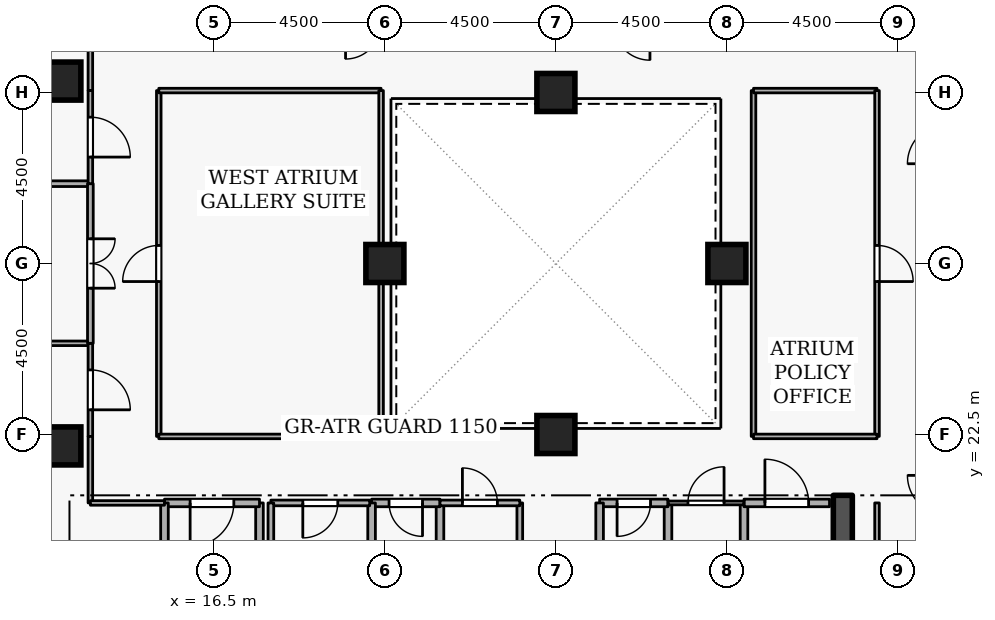
"""IFC4 building model, lengths in metres.
Left out: names, types, materials, properties, quantities, classifications, styles, units other than length and angle.
Written with IfcOpenShell. Run it as: python <this file> out.ifc"""

import sys

from ifc_helpers import new_model, si_unit, direction, frame, frame_2d, origin, origin_2d, place, context, subcontext, project, spatial, rectangle, extrude, element, fill, save


model = new_model("IFC4")
c1 = context("Model", 3, precision=1e-05, world=origin(), true_north=direction((0.0, 1.0)))
c2 = subcontext(c1, "Body", "Model", "MODEL_VIEW")
j1 = project(units=[si_unit("LENGTHUNIT", "METRE"), si_unit("PLANEANGLEUNIT", "RADIAN")], contexts=[c1])
p1 = place(None, origin())
s1 = spatial("IfcSite", under=j1, at=p1, CompositionType="ELEMENT")
p2 = place(p1, origin())
s2 = spatial("IfcBuilding", under=s1, at=p2, CompositionType="ELEMENT")
p3 = place(p2, frame((0.0, 0.0, 207.3)))
s3 = spatial("IfcBuildingStorey", under=s2, at=p3, CompositionType="ELEMENT", Elevation=207.3)
p4 = place(p3, frame((33.05, 15.1, 0.0), z_axis=(0.0, 0.0, 1.0), x_axis=(0.0, 1.0, 0.0)))
e1 = element("IfcWall", 1, at=p4, inside=s3, PredefinedType="SHEAR", context=c2, shape_type="SweptSolid", body=[
    extrude(rectangle(XDim=5.8, YDim=0.5, at=frame_2d((2.9, 0.0))), origin(), (0.0, 0.0, 1.0), 3.6),
])
for number, where, z_axis, x_axis in (
    (2, (12.5, 22.2, 0.0), (0.0, 0.0, 1.0), (1.0, 0.0, 0.0)),
    (3, (12.5, 31.8, 0.0), (0.0, 0.0, 1.0), (1.0, 0.0, 0.0)),
    (4, (25.5, 22.5, 0.0), (0.0, 0.0, 1.0), (1.0, 0.0, 0.0)),
    (5, (25.5, 31.5, 0.0), (0.0, 0.0, 1.0), (1.0, 0.0, 0.0)),
    (6, (21.0, 27.0, 0.0), (0.0, 0.0, 1.0), (1.0, 0.0, 0.0)),
    (7, (30.0, 27.0, 0.0), (0.0, 0.0, 1.0), (1.0, 0.0, 0.0)),
):
    element("IfcColumn", number, at=place(p3, frame(where, z_axis=z_axis, x_axis=x_axis)), inside=s3, PredefinedType="COLUMN", context=c2, shape_type="SweptSolid", body=[
        extrude(rectangle(XDim=1.0, YDim=1.0, at=origin_2d()), origin(), (0.0, 0.0, 1.0), 3.6),
    ])
p5 = place(p3, frame((17.7, 18.4, 0.0), z_axis=(0.0, 0.0, 1.0), x_axis=(0.0, 1.0, 0.0)))
e8 = element("IfcWall", 8, at=p5, inside=s3, PredefinedType="STANDARD", context=c2, shape_type="SweptSolid", body=[
    extrude(rectangle(XDim=2.3, YDim=0.2, at=frame_2d((1.15, 0.0))), origin(), (0.0, 0.0, 1.0), 2.545),
])
p6 = place(p3, frame((17.7, 20.7, 0.0), z_axis=(0.0, 0.0, 1.0), x_axis=(-1.0, 0.0, 0.0)))
e9 = element("IfcWall", 9, at=p6, inside=s3, PredefinedType="STANDARD", context=c2, shape_type="SweptSolid", body=[
    extrude(rectangle(XDim=2.5, YDim=0.2, at=frame_2d((1.25, 0.0))), origin(), (0.0, 0.0, 1.0), 3.34),
])
p7 = place(p6, frame((0.675, 0.0, 0.0)))
e10 = element("IfcOpeningElement", 10, at=p7, cuts=e9, PredefinedType="OPENING", context=c2, shape_type="SweptSolid", body=[
    extrude(rectangle(XDim=1.15, YDim=2.1, at=frame_2d((0.575, 1.05))), frame((0.0, 0.11, 0.0), z_axis=(0.0, -1.0, 0.0), x_axis=(1.0, 0.0, 0.0)), (0.0, 0.0, 1.0), 0.22),
])
p8 = place(p3, frame((15.2, 20.7, 0.0), z_axis=(0.0, 0.0, 1.0), x_axis=(0.0, -1.0, 0.0)))
e11 = element("IfcWall", 11, at=p8, inside=s3, PredefinedType="STANDARD", context=c2, shape_type="SweptSolid", body=[
    extrude(rectangle(XDim=5.7, YDim=0.2, at=frame_2d((2.85, 0.0))), origin(), (0.0, 0.0, 1.0), 3.34),
])
p9 = place(p3, frame((28.45, 18.65, 0.0), z_axis=(0.0, 0.0, 1.0), x_axis=(0.0, 1.0, 0.0)))
e12 = element("IfcWall", 12, at=p9, inside=s3, PredefinedType="STANDARD", context=c2, shape_type="SweptSolid", body=[
    extrude(rectangle(XDim=2.05, YDim=0.2, at=frame_2d((1.025, 0.0))), origin(), (0.0, 0.0, 1.0), 3.34),
])
p10 = place(p3, frame((28.45, 20.7, 0.0), z_axis=(0.0, 0.0, 1.0), x_axis=(-1.0, 0.0, 0.0)))
e13 = element("IfcWall", 13, at=p10, inside=s3, PredefinedType="STANDARD", context=c2, shape_type="SweptSolid", body=[
    extrude(rectangle(XDim=1.8, YDim=0.2, at=frame_2d((0.9, 0.0))), origin(), (0.0, 0.0, 1.0), 3.34),
])
p11 = place(p10, frame((0.46, 0.0, 0.0)))
e14 = element("IfcOpeningElement", 14, at=p11, cuts=e13, PredefinedType="OPENING", context=c2, shape_type="SweptSolid", body=[
    extrude(rectangle(XDim=0.88, YDim=2.04, at=frame_2d((0.44, 1.02))), frame((0.0, 0.11, 0.0), z_axis=(0.0, -1.0, 0.0), x_axis=(1.0, 0.0, 0.0)), (0.0, 0.0, 1.0), 0.22),
])
for number, where, z_axis, x_axis in (
    (15, (26.65, 20.7, 0.0), (0.0, 0.0, 1.0), (0.0, -1.0, 0.0)),
    (16, (22.45, 18.65, 0.0), (0.0, 0.0, 1.0), (0.0, 1.0, 0.0)),
):
    element("IfcWall", number, at=place(p3, frame(where, z_axis=z_axis, x_axis=x_axis)), inside=s3, PredefinedType="STANDARD", context=c2, shape_type="SweptSolid", body=[
        extrude(rectangle(XDim=2.05, YDim=0.2, at=frame_2d((1.025, 0.0))), origin(), (0.0, 0.0, 1.0), 3.34),
    ])
p12 = place(p3, frame((22.45, 20.7, 0.0), z_axis=(0.0, 0.0, 1.0), x_axis=(-1.0, 0.0, 0.0)))
e17 = element("IfcWall", 17, at=p12, inside=s3, PredefinedType="STANDARD", context=c2, shape_type="SweptSolid", body=[
    extrude(rectangle(XDim=1.8, YDim=0.2, at=frame_2d((0.9, 0.0))), origin(), (0.0, 0.0, 1.0), 3.34),
])
p13 = place(p12, frame((0.46, 0.0, 0.0)))
e18 = element("IfcOpeningElement", 18, at=p13, cuts=e17, PredefinedType="OPENING", context=c2, shape_type="SweptSolid", body=[
    extrude(rectangle(XDim=0.88, YDim=2.04, at=frame_2d((0.44, 1.02))), frame((0.0, 0.11, 0.0), z_axis=(0.0, -1.0, 0.0), x_axis=(1.0, 0.0, 0.0)), (0.0, 0.0, 1.0), 0.22),
])
for number, where, z_axis, x_axis in (
    (19, (20.65, 20.7, 0.0), (0.0, 0.0, 1.0), (0.0, -1.0, 0.0)),
    (20, (30.45, 18.65, 0.0), (0.0, 0.0, 1.0), (0.0, 1.0, 0.0)),
):
    element("IfcWall", number, at=place(p3, frame(where, z_axis=z_axis, x_axis=x_axis)), inside=s3, PredefinedType="STANDARD", context=c2, shape_type="SweptSolid", body=[
        extrude(rectangle(XDim=2.05, YDim=0.2, at=frame_2d((1.025, 0.0))), origin(), (0.0, 0.0, 1.0), 3.34),
    ])
p14 = place(p3, frame((30.45, 20.7, 0.0), z_axis=(0.0, 0.0, 1.0), x_axis=(1.0, 0.0, 0.0)))
e21 = element("IfcWall", 21, at=p14, inside=s3, PredefinedType="STANDARD", context=c2, shape_type="SweptSolid", body=[
    extrude(rectangle(XDim=2.25, YDim=0.2, at=frame_2d((1.125, 0.0))), origin(), (0.0, 0.0, 1.0), 3.34),
])
p15 = place(p14, frame((0.55, 0.0, 0.0)))
e22 = element("IfcOpeningElement", 22, at=p15, cuts=e21, PredefinedType="OPENING", context=c2, shape_type="SweptSolid", body=[
    extrude(rectangle(XDim=1.15, YDim=2.1, at=frame_2d((0.575, 1.05))), frame((0.0, 0.11, 0.0), z_axis=(0.0, -1.0, 0.0), x_axis=(1.0, 0.0, 0.0)), (0.0, 0.0, 1.0), 0.22),
])
p16 = place(p3, frame((20.6, 20.7, 0.0), z_axis=(0.0, 0.0, 1.0), x_axis=(-1.0, 0.0, 0.0)))
e23 = element("IfcWall", 23, at=p16, inside=s3, PredefinedType="PARTITIONING", context=c2, shape_type="SweptSolid", body=[
    extrude(rectangle(XDim=2.6, YDim=0.15, at=frame_2d((1.3, 0.0))), origin(), (0.0, 0.0, 1.0), 3.34),
])
p17 = place(p16, frame((0.84, 0.0, 0.0)))
e24 = element("IfcOpeningElement", 24, at=p17, cuts=e23, PredefinedType="OPENING", context=c2, shape_type="SweptSolid", body=[
    extrude(rectangle(XDim=0.92, YDim=2.08, at=frame_2d((0.46, 1.04))), frame((0.0, 0.085, 0.0), z_axis=(0.0, -1.0, 0.0), x_axis=(1.0, 0.0, 0.0)), (0.0, 0.0, 1.0), 0.17),
])
p18 = place(p3, frame((18.0, 20.7, 0.0), z_axis=(0.0, 0.0, 1.0), x_axis=(0.0, -1.0, 0.0)))
e25 = element("IfcWall", 25, at=p18, inside=s3, PredefinedType="PARTITIONING", context=c2, shape_type="SweptSolid", body=[
    extrude(rectangle(XDim=2.05, YDim=0.15, at=frame_2d((1.025, 0.0))), origin(), (0.0, 0.0, 1.0), 2.545),
])
p19 = place(p3, frame((24.55, 20.7, 0.0), z_axis=(0.0, 0.0, 1.0), x_axis=(0.0, -1.0, 0.0)))
e26 = element("IfcWall", 26, at=p19, inside=s3, PredefinedType="PARTITIONING", context=c2, shape_type="SweptSolid", body=[
    extrude(rectangle(XDim=2.05, YDim=0.15, at=frame_2d((1.025, 0.0))), origin(), (0.0, 0.0, 1.0), 3.34),
])
p20 = place(p3, frame((22.45, 20.7, 0.0), z_axis=(0.0, 0.0, 1.0), x_axis=(1.0, 0.0, 0.0)))
e27 = element("IfcWall", 27, at=p20, inside=s3, PredefinedType="PARTITIONING", context=c2, shape_type="SweptSolid", body=[
    extrude(rectangle(XDim=2.1, YDim=0.15, at=frame_2d((1.05, 0.0))), origin(), (0.0, 0.0, 1.0), 3.34),
])
p21 = place(p20, frame((0.59, 0.0, 0.0)))
e28 = element("IfcOpeningElement", 28, at=p21, cuts=e27, PredefinedType="OPENING", context=c2, shape_type="SweptSolid", body=[
    extrude(rectangle(XDim=0.92, YDim=2.08, at=frame_2d((0.46, 1.04))), frame((0.0, 0.085, 0.0), z_axis=(0.0, -1.0, 0.0), x_axis=(1.0, 0.0, 0.0)), (0.0, 0.0, 1.0), 0.17),
])
p22 = place(p3, frame((28.45, 20.7, 0.0), z_axis=(0.0, 0.0, 1.0), x_axis=(1.0, 0.0, 0.0)))
e29 = element("IfcWall", 29, at=p22, inside=s3, PredefinedType="PARTITIONING", context=c2, shape_type="SweptSolid", body=[
    extrude(rectangle(XDim=2.0, YDim=0.1, at=frame_2d((1.0, 0.0))), origin(), (0.0, 0.0, 1.0), 3.34),
])
p23 = place(p22, frame((0.525, 0.0, 0.0)))
e30 = element("IfcOpeningElement", 30, at=p23, cuts=e29, PredefinedType="OPENING", context=c2, shape_type="SweptSolid", body=[
    extrude(rectangle(XDim=0.95, YDim=2.1, at=frame_2d((0.475, 1.05))), frame((0.0, 0.06, 0.0), z_axis=(0.0, -1.0, 0.0), x_axis=(1.0, 0.0, 0.0)), (0.0, 0.0, 1.0), 0.12),
])
p24 = place(p3, frame((33.95, 20.7, 0.0), z_axis=(0.0, 0.0, 1.0), x_axis=(0.0, -1.0, 0.0)))
e31 = element("IfcWall", 31, at=p24, inside=s3, PredefinedType="PARTITIONING", context=c2, shape_type="SweptSolid", body=[
    extrude(rectangle(XDim=5.9, YDim=0.12, at=frame_2d((2.95, 0.0))), origin(), (0.0, 0.0, 1.0), 3.34),
])
p25 = place(p3, frame((1.78, 24.9, 0.0), z_axis=(0.0, 0.0, 1.0), x_axis=(1.0, 0.0, 0.0)))
e32 = element("IfcWall", 32, at=p25, inside=s3, PredefinedType="PARTITIONING", context=c2, shape_type="SweptSolid", body=[
    extrude(rectangle(XDim=11.47, YDim=0.12, at=frame_2d((5.735, 0.0))), origin(), (0.0, 0.0, 1.0), 3.34),
])
p26 = place(p3, frame((13.25, 24.9, 0.0), z_axis=(0.0, 0.0, 1.0), x_axis=(0.0, -1.0, 0.0)))
e33 = element("IfcWall", 33, at=p26, inside=s3, PredefinedType="PARTITIONING", context=c2, shape_type="SweptSolid", body=[
    extrude(rectangle(XDim=2.45, YDim=0.12, at=frame_2d((1.225, 0.0))), origin(), (0.0, 0.0, 1.0), 3.34),
])
p27 = place(p26, frame((0.7, 0.0, 0.0)))
e34 = element("IfcOpeningElement", 34, at=p27, cuts=e33, PredefinedType="OPENING", context=c2, shape_type="SweptSolid", body=[
    extrude(rectangle(XDim=1.05, YDim=2.1, at=frame_2d((0.525, 1.05))), frame((0.0, 0.07, 0.0), z_axis=(0.0, -1.0, 0.0), x_axis=(1.0, 0.0, 0.0)), (0.0, 0.0, 1.0), 0.14),
])
p28 = place(p3, frame((13.25, 22.45, 0.0), z_axis=(0.0, 0.0, 1.0), x_axis=(0.0, -1.0, 0.0)))
e35 = element("IfcWall", 35, at=p28, inside=s3, PredefinedType="PARTITIONING", context=c2, shape_type="SweptSolid", body=[
    extrude(rectangle(XDim=1.75, YDim=0.12, at=frame_2d((0.875, 0.0))), origin(), (0.0, 0.0, 1.0), 3.34),
])
p29 = place(p3, frame((13.25, 20.7, 0.0), z_axis=(0.0, 0.0, 1.0), x_axis=(1.0, 0.0, 0.0)))
e36 = element("IfcWall", 36, at=p29, inside=s3, PredefinedType="PARTITIONING", context=c2, shape_type="SweptSolid", body=[
    extrude(rectangle(XDim=1.95, YDim=0.12, at=frame_2d((0.975, 0.0))), origin(), (0.0, 0.0, 1.0), 3.34),
])
p30 = place(p3, frame((1.78, 29.1, 0.0), z_axis=(0.0, 0.0, 1.0), x_axis=(1.0, 0.0, 0.0)))
e37 = element("IfcWall", 37, at=p30, inside=s3, PredefinedType="PARTITIONING", context=c2, shape_type="SweptSolid", body=[
    extrude(rectangle(XDim=11.47, YDim=0.15, at=frame_2d((5.735, 0.0))), origin(), (0.0, 0.0, 1.0), 3.34),
])
p31 = place(p3, frame((13.25, 29.1, 0.0), z_axis=(0.0, 0.0, 1.0), x_axis=(0.0, -1.0, 0.0)))
e38 = element("IfcWall", 38, at=p31, inside=s3, PredefinedType="PARTITIONING", context=c2, shape_type="SweptSolid", body=[
    extrude(rectangle(XDim=4.2, YDim=0.15, at=frame_2d((2.1, 0.0))), origin(), (0.0, 0.0, 1.0), 3.34),
])
p32 = place(p31, frame((1.45, 0.0, 0.0)))
e39 = element("IfcOpeningElement", 39, at=p32, cuts=e38, PredefinedType="OPENING", context=c2, shape_type="SweptSolid", body=[
    extrude(rectangle(XDim=1.3, YDim=2.12, at=frame_2d((0.65, 1.06))), frame((0.0, 0.085, 0.0), z_axis=(0.0, -1.0, 0.0), x_axis=(1.0, 0.0, 0.0)), (0.0, 0.0, 1.0), 0.17),
])
p33 = place(p3, frame((13.25, 33.3, 0.0), z_axis=(0.0, 0.0, 1.0), x_axis=(0.0, -1.0, 0.0)))
e40 = element("IfcWall", 40, at=p33, inside=s3, PredefinedType="PARTITIONING", context=c2, shape_type="SweptSolid", body=[
    extrude(rectangle(XDim=1.75, YDim=0.12, at=frame_2d((0.875, 0.0))), origin(), (0.0, 0.0, 1.0), 3.34),
])
p34 = place(p3, frame((13.25, 31.55, 0.0), z_axis=(0.0, 0.0, 1.0), x_axis=(0.0, -1.0, 0.0)))
e41 = element("IfcWall", 41, at=p34, inside=s3, PredefinedType="PARTITIONING", context=c2, shape_type="SweptSolid", body=[
    extrude(rectangle(XDim=2.45, YDim=0.12, at=frame_2d((1.225, 0.0))), origin(), (0.0, 0.0, 1.0), 3.34),
])
p35 = place(p34, frame((0.7, 0.0, 0.0)))
e42 = element("IfcOpeningElement", 42, at=p35, cuts=e41, PredefinedType="OPENING", context=c2, shape_type="SweptSolid", body=[
    extrude(rectangle(XDim=1.05, YDim=2.1, at=frame_2d((0.525, 1.05))), frame((0.0, 0.07, 0.0), z_axis=(0.0, -1.0, 0.0), x_axis=(1.0, 0.0, 0.0)), (0.0, 0.0, 1.0), 0.14),
])
p36 = place(p3, frame((15.05, 22.45, 0.0), z_axis=(0.0, 0.0, 1.0), x_axis=(0.0, 1.0, 0.0)))
e43 = element("IfcWall", 43, at=p36, inside=s3, PredefinedType="PARTITIONING", context=c2, shape_type="SweptSolid", body=[
    extrude(rectangle(XDim=9.1, YDim=0.12, at=frame_2d((4.55, 0.0))), origin(), (0.0, 0.0, 1.0), 3.34),
])
p37 = place(p36, frame((4.075, 0.0, 0.0)))
e44 = element("IfcOpeningElement", 44, at=p37, cuts=e43, PredefinedType="OPENING", context=c2, shape_type="SweptSolid", body=[
    extrude(rectangle(XDim=0.95, YDim=2.1, at=frame_2d((0.475, 1.05))), frame((0.0, 0.07, 0.0), z_axis=(0.0, -1.0, 0.0), x_axis=(1.0, 0.0, 0.0)), (0.0, 0.0, 1.0), 0.14),
])
p38 = place(p3, frame((15.05, 31.55, 0.0), z_axis=(0.0, 0.0, 1.0), x_axis=(1.0, 0.0, 0.0)))
e45 = element("IfcWall", 45, at=p38, inside=s3, PredefinedType="PARTITIONING", context=c2, shape_type="SweptSolid", body=[
    extrude(rectangle(XDim=5.85, YDim=0.12, at=frame_2d((2.925, 0.0))), origin(), (0.0, 0.0, 1.0), 3.34),
])
p39 = place(p3, frame((20.9, 31.55, 0.0), z_axis=(0.0, 0.0, 1.0), x_axis=(0.0, -1.0, 0.0)))
e46 = element("IfcWall", 46, at=p39, inside=s3, PredefinedType="PARTITIONING", context=c2, shape_type="SweptSolid", body=[
    extrude(rectangle(XDim=9.1, YDim=0.12, at=frame_2d((4.55, 0.0))), origin(), (0.0, 0.0, 1.0), 3.34),
])
p40 = place(p3, frame((20.9, 22.45, 0.0), z_axis=(0.0, 0.0, 1.0), x_axis=(-1.0, 0.0, 0.0)))
e47 = element("IfcWall", 47, at=p40, inside=s3, PredefinedType="PARTITIONING", context=c2, shape_type="SweptSolid", body=[
    extrude(rectangle(XDim=5.85, YDim=0.12, at=frame_2d((2.925, 0.0))), origin(), (0.0, 0.0, 1.0), 3.34),
])
p41 = place(p3, frame((30.7, 22.45, 0.0), z_axis=(0.0, 0.0, 1.0), x_axis=(0.0, 1.0, 0.0)))
e48 = element("IfcWall", 48, at=p41, inside=s3, PredefinedType="PARTITIONING", context=c2, shape_type="SweptSolid", body=[
    extrude(rectangle(XDim=9.1, YDim=0.12, at=frame_2d((4.55, 0.0))), origin(), (0.0, 0.0, 1.0), 3.34),
])
p42 = place(p3, frame((30.7, 31.55, 0.0), z_axis=(0.0, 0.0, 1.0), x_axis=(1.0, 0.0, 0.0)))
e49 = element("IfcWall", 49, at=p42, inside=s3, PredefinedType="PARTITIONING", context=c2, shape_type="SweptSolid", body=[
    extrude(rectangle(XDim=3.25, YDim=0.12, at=frame_2d((1.625, 0.0))), origin(), (0.0, 0.0, 1.0), 3.34),
])
p43 = place(p3, frame((33.95, 31.55, 0.0), z_axis=(0.0, 0.0, 1.0), x_axis=(0.0, -1.0, 0.0)))
e50 = element("IfcWall", 50, at=p43, inside=s3, PredefinedType="PARTITIONING", context=c2, shape_type="SweptSolid", body=[
    extrude(rectangle(XDim=9.1, YDim=0.12, at=frame_2d((4.55, 0.0))), origin(), (0.0, 0.0, 1.0), 3.34),
])
p44 = place(p43, frame((4.075, 0.0, 0.0)))
e51 = element("IfcOpeningElement", 51, at=p44, cuts=e50, PredefinedType="OPENING", context=c2, shape_type="SweptSolid", body=[
    extrude(rectangle(XDim=0.95, YDim=2.1, at=frame_2d((0.475, 1.05))), frame((0.0, 0.07, 0.0), z_axis=(0.0, -1.0, 0.0), x_axis=(1.0, 0.0, 0.0)), (0.0, 0.0, 1.0), 0.14),
])
p45 = place(p3, frame((33.95, 22.45, 0.0), z_axis=(0.0, 0.0, 1.0), x_axis=(-1.0, 0.0, 0.0)))
e52 = element("IfcWall", 52, at=p45, inside=s3, PredefinedType="PARTITIONING", context=c2, shape_type="SweptSolid", body=[
    extrude(rectangle(XDim=3.25, YDim=0.12, at=frame_2d((1.625, 0.0))), origin(), (0.0, 0.0, 1.0), 3.34),
])
p46 = place(p7, origin())
e53 = element("IfcDoor", 53, at=p46, inside=s3, OperationType="SINGLE_SWING_RIGHT", PredefinedType="DOOR", context=c2, shape_type="SweptSolid", body=[
    extrude(rectangle(XDim=1.15, YDim=2.1, at=frame_2d((0.575, 1.05))), frame((0.0, 0.025, 0.0), z_axis=(0.0, -1.0, 0.0), x_axis=(1.0, 0.0, 0.0)), (0.0, 0.0, 1.0), 0.05),
])
fill(e10, e53)
p47 = place(p11, origin())
e54 = element("IfcDoor", 54, at=p47, inside=s3, OperationType="SINGLE_SWING_RIGHT", PredefinedType="DOOR", context=c2, shape_type="SweptSolid", body=[
    extrude(rectangle(XDim=0.88, YDim=2.04, at=frame_2d((0.44, 1.02))), frame((0.0, 0.025, 0.0), z_axis=(0.0, -1.0, 0.0), x_axis=(1.0, 0.0, 0.0)), (0.0, 0.0, 1.0), 0.05),
])
fill(e14, e54)
p48 = place(p13, origin())
e55 = element("IfcDoor", 55, at=p48, inside=s3, OperationType="SINGLE_SWING_LEFT", PredefinedType="DOOR", context=c2, shape_type="SweptSolid", body=[
    extrude(rectangle(XDim=0.88, YDim=2.04, at=frame_2d((0.44, 1.02))), frame((0.0, 0.025, 0.0), z_axis=(0.0, -1.0, 0.0), x_axis=(1.0, 0.0, 0.0)), (0.0, 0.0, 1.0), 0.05),
])
fill(e18, e55)
p49 = place(p17, origin())
e56 = element("IfcDoor", 56, at=p49, inside=s3, OperationType="SINGLE_SWING_RIGHT", PredefinedType="DOOR", context=c2, shape_type="SweptSolid", body=[
    extrude(rectangle(XDim=0.92, YDim=2.08, at=frame_2d((0.46, 1.04))), frame((0.0, 0.025, 0.0), z_axis=(0.0, -1.0, 0.0), x_axis=(1.0, 0.0, 0.0)), (0.0, 0.0, 1.0), 0.05),
])
fill(e24, e56)
p50 = place(p21, origin())
e57 = element("IfcDoor", 57, at=p50, inside=s3, OperationType="SINGLE_SWING_LEFT", PredefinedType="DOOR", context=c2, shape_type="SweptSolid", body=[
    extrude(rectangle(XDim=0.92, YDim=2.08, at=frame_2d((0.46, 1.04))), frame((0.0, 0.025, 0.0), z_axis=(0.0, -1.0, 0.0), x_axis=(1.0, 0.0, 0.0)), (0.0, 0.0, 1.0), 0.05),
])
fill(e28, e57)
p51 = place(p23, origin())
e58 = element("IfcDoor", 58, at=p51, inside=s3, OperationType="SINGLE_SWING_RIGHT", PredefinedType="DOOR", context=c2, shape_type="SweptSolid", body=[
    extrude(rectangle(XDim=0.95, YDim=2.1, at=frame_2d((0.475, 1.05))), frame((0.0, 0.025, 0.0), z_axis=(0.0, -1.0, 0.0), x_axis=(1.0, 0.0, 0.0)), (0.0, 0.0, 1.0), 0.05),
])
fill(e30, e58)
p52 = place(p15, origin())
e59 = element("IfcDoor", 59, at=p52, inside=s3, OperationType="SINGLE_SWING_LEFT", PredefinedType="DOOR", context=c2, shape_type="SweptSolid", body=[
    extrude(rectangle(XDim=1.15, YDim=2.1, at=frame_2d((0.575, 1.05))), frame((0.0, 0.025, 0.0), z_axis=(0.0, -1.0, 0.0), x_axis=(1.0, 0.0, 0.0)), (0.0, 0.0, 1.0), 0.05),
])
fill(e22, e59)
p53 = place(p27, origin())
e60 = element("IfcDoor", 60, at=p53, inside=s3, OperationType="SINGLE_SWING_RIGHT", PredefinedType="DOOR", context=c2, shape_type="SweptSolid", body=[
    extrude(rectangle(XDim=1.05, YDim=2.1, at=frame_2d((0.525, 1.05))), frame((0.0, 0.025, 0.0), z_axis=(0.0, -1.0, 0.0), x_axis=(1.0, 0.0, 0.0)), (0.0, 0.0, 1.0), 0.05),
])
fill(e34, e60)
p54 = place(p32, origin())
e61 = element("IfcDoor", 61, at=p54, inside=s3, OperationType="DOUBLE_DOOR_SINGLE_SWING", PredefinedType="DOOR", context=c2, shape_type="SweptSolid", body=[
    extrude(rectangle(XDim=1.3, YDim=2.12, at=frame_2d((0.65, 1.06))), frame((0.0, 0.025, 0.0), z_axis=(0.0, -1.0, 0.0), x_axis=(1.0, 0.0, 0.0)), (0.0, 0.0, 1.0), 0.05),
])
fill(e39, e61)
p55 = place(p35, origin())
e62 = element("IfcDoor", 62, at=p55, inside=s3, OperationType="SINGLE_SWING_RIGHT", PredefinedType="DOOR", context=c2, shape_type="SweptSolid", body=[
    extrude(rectangle(XDim=1.05, YDim=2.1, at=frame_2d((0.525, 1.05))), frame((0.0, 0.025, 0.0), z_axis=(0.0, -1.0, 0.0), x_axis=(1.0, 0.0, 0.0)), (0.0, 0.0, 1.0), 0.05),
])
fill(e42, e62)
p56 = place(p37, origin())
e63 = element("IfcDoor", 63, at=p56, inside=s3, OperationType="SINGLE_SWING_LEFT", PredefinedType="DOOR", context=c2, shape_type="SweptSolid", body=[
    extrude(rectangle(XDim=0.95, YDim=2.1, at=frame_2d((0.475, 1.05))), frame((0.0, 0.025, 0.0), z_axis=(0.0, -1.0, 0.0), x_axis=(1.0, 0.0, 0.0)), (0.0, 0.0, 1.0), 0.05),
])
fill(e44, e63)
p57 = place(p44, origin())
e64 = element("IfcDoor", 64, at=p57, inside=s3, OperationType="SINGLE_SWING_RIGHT", PredefinedType="DOOR", context=c2, shape_type="SweptSolid", body=[
    extrude(rectangle(XDim=0.95, YDim=2.1, at=frame_2d((0.475, 1.05))), frame((0.0, 0.025, 0.0), z_axis=(0.0, -1.0, 0.0), x_axis=(1.0, 0.0, 0.0)), (0.0, 0.0, 1.0), 0.05),
])
fill(e51, e64)
save(model, sys.argv[1])
